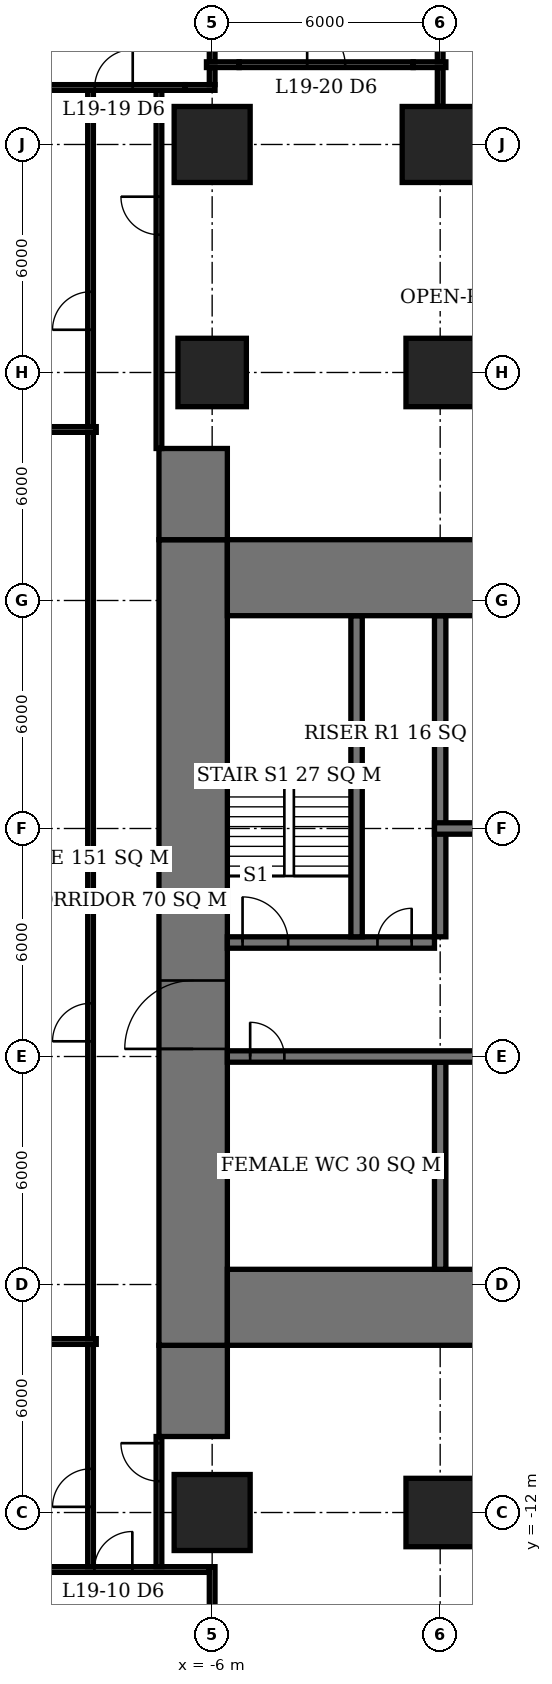
"""IFC4 building model, lengths in metres.
Left out: names, types, materials, properties, quantities, classifications, styles, units other than length and angle.
Written with IfcOpenShell. Run it as: python <this file> out.ifc"""

import sys

from ifc_helpers import new_model, si_unit, direction, frame, frame_2d, origin, origin_2d, place, context, subcontext, project, spatial, rectangle, extrude, element, fill, save


model = new_model("IFC4")
c1 = context("Model", 3, precision=1e-05, world=origin(), true_north=direction((0.0, 1.0)))
c2 = subcontext(c1, "Body", "Model", "MODEL_VIEW")
j1 = project(units=[si_unit("LENGTHUNIT", "METRE"), si_unit("PLANEANGLEUNIT", "RADIAN")], contexts=[c1])
p1 = place(None, origin())
s1 = spatial("IfcSite", under=j1, at=p1, CompositionType="ELEMENT")
p2 = place(p1, origin())
s2 = spatial("IfcBuilding", under=s1, at=p2, CompositionType="ELEMENT")
p3 = place(p2, frame((0.0, 0.0, 80.6)))
s3 = spatial("IfcBuildingStorey", under=s2, at=p3, CompositionType="ELEMENT", Elevation=80.6)
p4 = place(p3, frame((-6.0, -12.0, 0.0), z_axis=(0.0, 0.0, 1.0), x_axis=(1.0, 0.0, 0.0)))
e1 = element("IfcColumn", 1, at=p4, inside=s3, PredefinedType="COLUMN", context=c2, shape_type="SweptSolid", body=[
    extrude(rectangle(XDim=2.0, YDim=2.0, at=origin_2d()), origin(), (0.0, 0.0, 1.0), 3.9),
])
p5 = place(p3, frame((-6.0, 18.0, 0.0), z_axis=(0.0, 0.0, 1.0), x_axis=(1.0, 0.0, 0.0)))
e2 = element("IfcColumn", 2, at=p5, inside=s3, PredefinedType="COLUMN", context=c2, shape_type="SweptSolid", body=[
    extrude(rectangle(XDim=1.8, YDim=1.8, at=origin_2d()), origin(), (0.0, 0.0, 1.0), 3.9),
])
p6 = place(p3, frame((-6.0, 24.0, 0.0), z_axis=(0.0, 0.0, 1.0), x_axis=(1.0, 0.0, 0.0)))
e3 = element("IfcColumn", 3, at=p6, inside=s3, PredefinedType="COLUMN", context=c2, shape_type="SweptSolid", body=[
    extrude(rectangle(XDim=2.0, YDim=2.0, at=origin_2d()), origin(), (0.0, 0.0, 1.0), 3.9),
])
for number, where, z_axis, x_axis in (
    (4, (0.0, -12.0, 0.0), (0.0, 0.0, 1.0), (1.0, 0.0, 0.0)),
    (5, (0.0, 18.0, 0.0), (0.0, 0.0, 1.0), (1.0, 0.0, 0.0)),
):
    element("IfcColumn", number, at=place(p3, frame(where, z_axis=z_axis, x_axis=x_axis)), inside=s3, PredefinedType="COLUMN", context=c2, shape_type="SweptSolid", body=[
        extrude(rectangle(XDim=1.8, YDim=1.8, at=origin_2d()), origin(), (0.0, 0.0, 1.0), 3.9),
    ])
p7 = place(p3, frame((0.0, 24.0, 0.0), z_axis=(0.0, 0.0, 1.0), x_axis=(1.0, 0.0, 0.0)))
e6 = element("IfcColumn", 6, at=p7, inside=s3, PredefinedType="COLUMN", context=c2, shape_type="SweptSolid", body=[
    extrude(rectangle(XDim=2.0, YDim=2.0, at=origin_2d()), origin(), (0.0, 0.0, 1.0), 3.9),
])
for number, where, z_axis, x_axis in (
    (7, (-5.6, -6.6, 0.0), (0.0, 0.0, 1.0), (1.0, 0.0, 0.0)),
    (8, (-5.6, 12.6, 0.0), (0.0, 0.0, 1.0), (1.0, 0.0, 0.0)),
):
    element("IfcWall", number, at=place(p3, frame(where, z_axis=z_axis, x_axis=x_axis)), inside=s3, PredefinedType="SHEAR", context=c2, shape_type="SweptSolid", body=[
        extrude(rectangle(XDim=23.2, YDim=2.0, at=frame_2d((11.6, 0.0))), origin(), (0.0, 0.0, 1.0), 3.9),
    ])
p8 = place(p3, frame((-6.5, -7.6, 0.0), z_axis=(0.0, 0.0, 1.0), x_axis=(0.0, 1.0, 0.0)))
e9 = element("IfcWall", 9, at=p8, inside=s3, PredefinedType="SHEAR", context=c2, shape_type="SweptSolid", body=[
    extrude(rectangle(XDim=21.2, YDim=1.8, at=frame_2d((10.6, 0.0))), origin(), (0.0, 0.0, 1.0), 3.9),
])
p9 = place(p8, frame((7.8, 0.0, 0.0)))
e10 = element("IfcOpeningElement", 10, at=p9, cuts=e9, PredefinedType="OPENING", context=c2, shape_type="SweptSolid", body=[
    extrude(rectangle(XDim=1.8, YDim=2.4, at=frame_2d((0.9, 1.2))), frame((0.0, 0.91, 0.0), z_axis=(0.0, -1.0, 0.0), x_axis=(1.0, 0.0, 0.0)), (0.0, 0.0, 1.0), 1.82),
])
for number, where, z_axis, x_axis in (
    (11, (-6.5, -10.0, 0.0), (0.0, 0.0, 1.0), (0.0, 1.0, 0.0)),
    (12, (-6.5, 13.6, 0.0), (0.0, 0.0, 1.0), (0.0, 1.0, 0.0)),
):
    element("IfcWall", number, at=place(p3, frame(where, z_axis=z_axis, x_axis=x_axis)), inside=s3, PredefinedType="SHEAR", context=c2, shape_type="SweptSolid", body=[
        extrude(rectangle(XDim=2.4, YDim=1.8, at=frame_2d((1.2, 0.0))), origin(), (0.0, 0.0, 1.0), 3.9),
    ])
p10 = place(p3, frame((-5.6, 0.0, 0.0), z_axis=(0.0, 0.0, 1.0), x_axis=(1.0, 0.0, 0.0)))
e13 = element("IfcWall", 13, at=p10, inside=s3, PredefinedType="SHEAR", context=c2, shape_type="SweptSolid", body=[
    extrude(rectangle(XDim=17.75, YDim=0.3, at=frame_2d((8.875, 0.0))), origin(), (0.0, 0.0, 1.0), 3.9),
])
p11 = place(p10, frame((0.6, 0.0, 0.0)))
e14 = element("IfcOpeningElement", 14, at=p11, cuts=e13, PredefinedType="OPENING", context=c2, shape_type="SweptSolid", body=[
    extrude(rectangle(XDim=0.9, YDim=2.1, at=frame_2d((0.45, 1.05))), frame((0.0, 0.16, 0.0), z_axis=(0.0, -1.0, 0.0), x_axis=(1.0, 0.0, 0.0)), (0.0, 0.0, 1.0), 0.32),
])
p12 = place(p3, frame((-5.6, 3.0, 0.0), z_axis=(0.0, 0.0, 1.0), x_axis=(1.0, 0.0, 0.0)))
e15 = element("IfcWall", 15, at=p12, inside=s3, PredefinedType="SHEAR", context=c2, shape_type="SweptSolid", body=[
    extrude(rectangle(XDim=5.45, YDim=0.3, at=frame_2d((2.725, 0.0))), origin(), (0.0, 0.0, 1.0), 3.9),
])
p13 = place(p12, frame((0.4, 0.0, 0.0)))
e16 = element("IfcOpeningElement", 16, at=p13, cuts=e15, PredefinedType="OPENING", context=c2, shape_type="SweptSolid", body=[
    extrude(rectangle(XDim=1.2, YDim=2.1, at=frame_2d((0.6, 1.05))), frame((0.0, 0.16, 0.0), z_axis=(0.0, -1.0, 0.0), x_axis=(1.0, 0.0, 0.0)), (0.0, 0.0, 1.0), 0.32),
])
p14 = place(p12, frame((3.95, 0.0, 0.0)))
e17 = element("IfcOpeningElement", 17, at=p14, cuts=e15, PredefinedType="OPENING", context=c2, shape_type="SweptSolid", body=[
    extrude(rectangle(XDim=0.9, YDim=2.1, at=frame_2d((0.45, 1.05))), frame((0.0, 0.16, 0.0), z_axis=(0.0, -1.0, 0.0), x_axis=(1.0, 0.0, 0.0)), (0.0, 0.0, 1.0), 0.32),
])
p15 = place(p3, frame((-0.15, 6.0, 0.0), z_axis=(0.0, 0.0, 1.0), x_axis=(1.0, 0.0, 0.0)))
e18 = element("IfcWall", 18, at=p15, inside=s3, PredefinedType="SHEAR", context=c2, shape_type="SweptSolid", body=[
    extrude(rectangle(XDim=17.75, YDim=0.3, at=frame_2d((8.875, 0.0))), origin(), (0.0, 0.0, 1.0), 3.9),
])
p16 = place(p15, frame((13.15, 0.0, 0.0)))
e19 = element("IfcOpeningElement", 19, at=p16, cuts=e18, PredefinedType="OPENING", context=c2, shape_type="SweptSolid", body=[
    extrude(rectangle(XDim=0.9, YDim=2.1, at=frame_2d((0.45, 1.05))), frame((0.0, 0.16, 0.0), z_axis=(0.0, -1.0, 0.0), x_axis=(1.0, 0.0, 0.0)), (0.0, 0.0, 1.0), 0.32),
])
p17 = place(p15, frame((16.25, 0.0, 0.0)))
e20 = element("IfcOpeningElement", 20, at=p17, cuts=e18, PredefinedType="OPENING", context=c2, shape_type="SweptSolid", body=[
    extrude(rectangle(XDim=1.0, YDim=2.1, at=frame_2d((0.5, 1.05))), frame((0.0, 0.16, 0.0), z_axis=(0.0, -1.0, 0.0), x_axis=(1.0, 0.0, 0.0)), (0.0, 0.0, 1.0), 0.32),
])
p18 = place(p15, frame((1.1, 0.0, 0.0)))
e21 = element("IfcOpeningElement", 21, at=p18, cuts=e18, PredefinedType="OPENING", context=c2, shape_type="SweptSolid", body=[
    extrude(rectangle(XDim=1.1, YDim=2.1, at=frame_2d((0.55, 1.05))), frame((0.0, 0.16, 0.0), z_axis=(0.0, -1.0, 0.0), x_axis=(1.0, 0.0, 0.0)), (0.0, 0.0, 1.0), 0.32),
])
p19 = place(p15, frame((4.1, 0.0, 0.0)))
e22 = element("IfcOpeningElement", 22, at=p19, cuts=e18, PredefinedType="OPENING", context=c2, shape_type="SweptSolid", body=[
    extrude(rectangle(XDim=1.1, YDim=2.1, at=frame_2d((0.55, 1.05))), frame((0.0, 0.16, 0.0), z_axis=(0.0, -1.0, 0.0), x_axis=(1.0, 0.0, 0.0)), (0.0, 0.0, 1.0), 0.32),
])
p20 = place(p15, frame((7.1, 0.0, 0.0)))
e23 = element("IfcOpeningElement", 23, at=p20, cuts=e18, PredefinedType="OPENING", context=c2, shape_type="SweptSolid", body=[
    extrude(rectangle(XDim=1.1, YDim=2.1, at=frame_2d((0.55, 1.05))), frame((0.0, 0.16, 0.0), z_axis=(0.0, -1.0, 0.0), x_axis=(1.0, 0.0, 0.0)), (0.0, 0.0, 1.0), 0.32),
])
p21 = place(p15, frame((10.1, 0.0, 0.0)))
e24 = element("IfcOpeningElement", 24, at=p21, cuts=e18, PredefinedType="OPENING", context=c2, shape_type="SweptSolid", body=[
    extrude(rectangle(XDim=1.1, YDim=2.1, at=frame_2d((0.55, 1.05))), frame((0.0, 0.16, 0.0), z_axis=(0.0, -1.0, 0.0), x_axis=(1.0, 0.0, 0.0)), (0.0, 0.0, 1.0), 0.32),
])
p22 = place(p3, frame((0.0, -5.6, 0.0), z_axis=(0.0, 0.0, 1.0), x_axis=(0.0, 1.0, 0.0)))
e25 = element("IfcWall", 25, at=p22, inside=s3, PredefinedType="SHEAR", context=c2, shape_type="SweptSolid", body=[
    extrude(rectangle(XDim=5.45, YDim=0.3, at=frame_2d((2.725, 0.0))), origin(), (0.0, 0.0, 1.0), 3.9),
])
for number, where, z_axis, x_axis in (
    (26, (0.0, 3.15, 0.0), (0.0, 0.0, 1.0), (0.0, 1.0, 0.0)),
    (27, (-2.2, 3.15, 0.0), (0.0, 0.0, 1.0), (0.0, 1.0, 0.0)),
):
    element("IfcWall", number, at=place(p3, frame(where, z_axis=z_axis, x_axis=x_axis)), inside=s3, PredefinedType="SHEAR", context=c2, shape_type="SweptSolid", body=[
        extrude(rectangle(XDim=8.45, YDim=0.3, at=frame_2d((4.225, 0.0))), origin(), (0.0, 0.0, 1.0), 3.9),
    ])
p23 = place(p3, frame((-11.925, -13.5, 0.0), z_axis=(0.0, 0.0, 1.0), x_axis=(1.0, 0.0, 0.0)))
e28 = element("IfcWall", 28, at=p23, inside=s3, PredefinedType="PARTITIONING", context=c2, shape_type="SweptSolid", body=[
    extrude(rectangle(XDim=5.85, YDim=0.15, at=frame_2d((2.925, 0.0))), origin(), (0.0, 0.0, 1.0), 3.65),
])
p24 = place(p23, frame((2.825, 0.0, 0.0)))
e29 = element("IfcOpeningElement", 29, at=p24, cuts=e28, PredefinedType="OPENING", context=c2, shape_type="SweptSolid", body=[
    extrude(rectangle(XDim=1.0, YDim=2.1, at=frame_2d((0.5, 1.05))), frame((0.0, 0.085, 0.0), z_axis=(0.0, -1.0, 0.0), x_axis=(1.0, 0.0, 0.0)), (0.0, 0.0, 1.0), 0.17),
])
p25 = place(p3, frame((-11.49, 25.5, 0.0), z_axis=(0.0, 0.0, 1.0), x_axis=(1.0, 0.0, 0.0)))
e30 = element("IfcWall", 30, at=p25, inside=s3, PredefinedType="PARTITIONING", context=c2, shape_type="SweptSolid", body=[
    extrude(rectangle(XDim=4.78, YDim=0.15, at=frame_2d((2.39, 0.0))), origin(), (0.0, 0.0, 1.0), 3.65),
])
p26 = place(p25, frame((2.4, 0.0, 0.0)))
e31 = element("IfcOpeningElement", 31, at=p26, cuts=e30, PredefinedType="OPENING", context=c2, shape_type="SweptSolid", body=[
    extrude(rectangle(XDim=1.0, YDim=2.1, at=frame_2d((0.5, 1.05))), frame((0.0, 0.085, 0.0), z_axis=(0.0, -1.0, 0.0), x_axis=(1.0, 0.0, 0.0)), (0.0, 0.0, 1.0), 0.17),
])
p27 = place(p3, frame((-6.71, 25.5, 0.0), z_axis=(0.0, 0.0, 1.0), x_axis=(1.0, 0.0, 0.0)))
e32 = element("IfcWall", 32, at=p27, inside=s3, PredefinedType="PARTITIONING", context=c2, shape_type="SweptSolid", body=[
    extrude(rectangle(XDim=0.785, YDim=0.15, at=frame_2d((0.393, 0.0))), origin(), (0.0, 0.0, 1.0), 2.65),
])
p28 = place(p3, frame((-6.15, 26.1, 0.0), z_axis=(0.0, 0.0, 1.0), x_axis=(1.0, 0.0, 0.0)))
e33 = element("IfcWall", 33, at=p28, inside=s3, PredefinedType="PARTITIONING", context=c2, shape_type="SweptSolid", body=[
    extrude(rectangle(XDim=0.86, YDim=0.15, at=frame_2d((0.43, 0.0))), origin(), (0.0, 0.0, 1.0), 2.65),
])
p29 = place(p3, frame((-5.29, 26.1, 0.0), z_axis=(0.0, 0.0, 1.0), x_axis=(1.0, 0.0, 0.0)))
e34 = element("IfcWall", 34, at=p29, inside=s3, PredefinedType="PARTITIONING", context=c2, shape_type="SweptSolid", body=[
    extrude(rectangle(XDim=4.58, YDim=0.15, at=frame_2d((2.29, 0.0))), origin(), (0.0, 0.0, 1.0), 3.65),
])
p30 = place(p29, frame((1.79, 0.0, 0.0)))
e35 = element("IfcOpeningElement", 35, at=p30, cuts=e34, PredefinedType="OPENING", context=c2, shape_type="SweptSolid", body=[
    extrude(rectangle(XDim=1.0, YDim=2.1, at=frame_2d((0.5, 1.05))), frame((0.0, 0.085, 0.0), z_axis=(0.0, -1.0, 0.0), x_axis=(1.0, 0.0, 0.0)), (0.0, 0.0, 1.0), 0.17),
])
p31 = place(p3, frame((-0.71, 26.1, 0.0), z_axis=(0.0, 0.0, 1.0), x_axis=(1.0, 0.0, 0.0)))
e36 = element("IfcWall", 36, at=p31, inside=s3, PredefinedType="PARTITIONING", context=c2, shape_type="SweptSolid", body=[
    extrude(rectangle(XDim=0.86, YDim=0.15, at=frame_2d((0.43, 0.0))), origin(), (0.0, 0.0, 1.0), 2.65),
])
p32 = place(p3, frame((-6.0, -17.2, 0.0), z_axis=(0.0, 0.0, 1.0), x_axis=(0.0, 1.0, 0.0)))
e37 = element("IfcWall", 37, at=p32, inside=s3, PredefinedType="PARTITIONING", context=c2, shape_type="SweptSolid", body=[
    extrude(rectangle(XDim=3.775, YDim=0.15, at=frame_2d((1.887, 0.0))), origin(), (0.0, 0.0, 1.0), 3.65),
])
p33 = place(p3, frame((-6.0, 25.575, 0.0), z_axis=(0.0, 0.0, 1.0), x_axis=(0.0, 1.0, 0.0)))
e38 = element("IfcWall", 38, at=p33, inside=s3, PredefinedType="PARTITIONING", context=c2, shape_type="SweptSolid", body=[
    extrude(rectangle(XDim=0.45, YDim=0.15, at=frame_2d((0.225, 0.0))), origin(), (0.0, 0.0, 1.0), 2.65),
])
p34 = place(p3, frame((-6.0, 26.175, 0.0), z_axis=(0.0, 0.0, 1.0), x_axis=(0.0, 1.0, 0.0)))
e39 = element("IfcWall", 39, at=p34, inside=s3, PredefinedType="PARTITIONING", context=c2, shape_type="SweptSolid", body=[
    extrude(rectangle(XDim=2.135, YDim=0.15, at=frame_2d((1.067, 0.0))), origin(), (0.0, 0.0, 1.0), 2.65),
])
p35 = place(p3, frame((0.0, 25.0, 0.0), z_axis=(0.0, 0.0, 1.0), x_axis=(0.0, 1.0, 0.0)))
e40 = element("IfcWall", 40, at=p35, inside=s3, PredefinedType="PARTITIONING", context=c2, shape_type="SweptSolid", body=[
    extrude(rectangle(XDim=1.025, YDim=0.15, at=frame_2d((0.512, 0.0))), origin(), (0.0, 0.0, 1.0), 2.65),
])
p36 = place(p3, frame((0.0, 26.175, 0.0), z_axis=(0.0, 0.0, 1.0), x_axis=(0.0, 1.0, 0.0)))
e41 = element("IfcWall", 41, at=p36, inside=s3, PredefinedType="PARTITIONING", context=c2, shape_type="SweptSolid", body=[
    extrude(rectangle(XDim=2.135, YDim=0.15, at=frame_2d((1.067, 0.0))), origin(), (0.0, 0.0, 1.0), 2.65),
])
p37 = place(p3, frame((-19.6, -7.5, 0.0), z_axis=(0.0, 0.0, 1.0), x_axis=(1.0, 0.0, 0.0)))
e42 = element("IfcWall", 42, at=p37, inside=s3, PredefinedType="PARTITIONING", context=c2, shape_type="SweptSolid", body=[
    extrude(rectangle(XDim=10.55, YDim=0.15, at=frame_2d((5.275, 0.0))), origin(), (0.0, 0.0, 1.0), 3.65),
])
p38 = place(p3, frame((-14.025, 16.5, 0.0), z_axis=(0.0, 0.0, 1.0), x_axis=(1.0, 0.0, 0.0)))
e43 = element("IfcWall", 43, at=p38, inside=s3, PredefinedType="PARTITIONING", context=c2, shape_type="SweptSolid", body=[
    extrude(rectangle(XDim=4.975, YDim=0.15, at=frame_2d((2.487, 0.0))), origin(), (0.0, 0.0, 1.0), 3.65),
])
p39 = place(p3, frame((-9.2, -13.425, 0.0), z_axis=(0.0, 0.0, 1.0), x_axis=(0.0, 1.0, 0.0)))
e44 = element("IfcWall", 44, at=p39, inside=s3, PredefinedType="PARTITIONING", context=c2, shape_type="SweptSolid", body=[
    extrude(rectangle(XDim=5.85, YDim=0.15, at=frame_2d((2.925, 0.0))), origin(), (0.0, 0.0, 1.0), 3.65),
])
p40 = place(p39, frame((1.574, 0.0, 0.0)))
e45 = element("IfcOpeningElement", 45, at=p40, cuts=e44, PredefinedType="OPENING", context=c2, shape_type="SweptSolid", body=[
    extrude(rectangle(XDim=1.0, YDim=2.1, at=frame_2d((0.5, 1.05))), frame((0.0, 0.085, 0.0), z_axis=(0.0, -1.0, 0.0), x_axis=(1.0, 0.0, 0.0)), (0.0, 0.0, 1.0), 0.17),
])
p41 = place(p3, frame((-9.2, -7.425, 0.0), z_axis=(0.0, 0.0, 1.0), x_axis=(0.0, 1.0, 0.0)))
e46 = element("IfcWall", 46, at=p41, inside=s3, PredefinedType="PARTITIONING", context=c2, shape_type="SweptSolid", body=[
    extrude(rectangle(XDim=23.85, YDim=0.15, at=frame_2d((11.925, 0.0))), origin(), (0.0, 0.0, 1.0), 3.65),
])
p42 = place(p41, frame((7.825, 0.0, 0.0)))
e47 = element("IfcOpeningElement", 47, at=p42, cuts=e46, PredefinedType="OPENING", context=c2, shape_type="SweptSolid", body=[
    extrude(rectangle(XDim=1.0, YDim=2.1, at=frame_2d((0.5, 1.05))), frame((0.0, 0.085, 0.0), z_axis=(0.0, -1.0, 0.0), x_axis=(1.0, 0.0, 0.0)), (0.0, 0.0, 1.0), 0.17),
])
p43 = place(p3, frame((-9.2, 16.575, 0.0), z_axis=(0.0, 0.0, 1.0), x_axis=(0.0, 1.0, 0.0)))
e48 = element("IfcWall", 48, at=p43, inside=s3, PredefinedType="PARTITIONING", context=c2, shape_type="SweptSolid", body=[
    extrude(rectangle(XDim=8.85, YDim=0.15, at=frame_2d((4.425, 0.0))), origin(), (0.0, 0.0, 1.0), 3.65),
])
p44 = place(p43, frame((2.549, 0.0, 0.0)))
e49 = element("IfcOpeningElement", 49, at=p44, cuts=e48, PredefinedType="OPENING", context=c2, shape_type="SweptSolid", body=[
    extrude(rectangle(XDim=1.0, YDim=2.1, at=frame_2d((0.5, 1.05))), frame((0.0, 0.085, 0.0), z_axis=(0.0, -1.0, 0.0), x_axis=(1.0, 0.0, 0.0)), (0.0, 0.0, 1.0), 0.17),
])
p45 = place(p3, frame((-7.4, -13.425, 0.0), z_axis=(0.0, 0.0, 1.0), x_axis=(0.0, 1.0, 0.0)))
e50 = element("IfcWall", 50, at=p45, inside=s3, PredefinedType="PARTITIONING", context=c2, shape_type="SweptSolid", body=[
    extrude(rectangle(XDim=3.425, YDim=0.15, at=frame_2d((1.712, 0.0))), origin(), (0.0, 0.0, 1.0), 3.65),
])
p46 = place(p45, frame((2.25, 0.0, 0.0)))
e51 = element("IfcOpeningElement", 51, at=p46, cuts=e50, PredefinedType="OPENING", context=c2, shape_type="SweptSolid", body=[
    extrude(rectangle(XDim=1.0, YDim=2.1, at=frame_2d((0.5, 1.05))), frame((0.0, 0.085, 0.0), z_axis=(0.0, -1.0, 0.0), x_axis=(1.0, 0.0, 0.0)), (0.0, 0.0, 1.0), 0.17),
])
p47 = place(p3, frame((-7.4, 16.0, 0.0), z_axis=(0.0, 0.0, 1.0), x_axis=(0.0, 1.0, 0.0)))
e52 = element("IfcWall", 52, at=p47, inside=s3, PredefinedType="PARTITIONING", context=c2, shape_type="SweptSolid", body=[
    extrude(rectangle(XDim=9.425, YDim=0.15, at=frame_2d((4.712, 0.0))), origin(), (0.0, 0.0, 1.0), 3.65),
])
p48 = place(p47, frame((5.626, 0.0, 0.0)))
e53 = element("IfcOpeningElement", 53, at=p48, cuts=e52, PredefinedType="OPENING", context=c2, shape_type="SweptSolid", body=[
    extrude(rectangle(XDim=1.0, YDim=2.1, at=frame_2d((0.5, 1.05))), frame((0.0, 0.085, 0.0), z_axis=(0.0, -1.0, 0.0), x_axis=(1.0, 0.0, 0.0)), (0.0, 0.0, 1.0), 0.17),
])
p49 = place(p9, origin())
e54 = element("IfcDoor", 54, at=p49, inside=s3, OperationType="DOUBLE_DOOR_SINGLE_SWING", PredefinedType="DOOR", context=c2, shape_type="SweptSolid", body=[
    extrude(rectangle(XDim=1.8, YDim=2.4, at=frame_2d((0.9, 1.2))), frame((0.0, 0.025, 0.0), z_axis=(0.0, -1.0, 0.0), x_axis=(1.0, 0.0, 0.0)), (0.0, 0.0, 1.0), 0.05),
])
fill(e10, e54)
p50 = place(p13, origin())
e55 = element("IfcDoor", 55, at=p50, inside=s3, OperationType="SINGLE_SWING_LEFT", PredefinedType="DOOR", context=c2, shape_type="SweptSolid", body=[
    extrude(rectangle(XDim=1.2, YDim=2.1, at=frame_2d((0.6, 1.05))), frame((0.0, 0.025, 0.0), z_axis=(0.0, -1.0, 0.0), x_axis=(1.0, 0.0, 0.0)), (0.0, 0.0, 1.0), 0.05),
])
fill(e16, e55)
p51 = place(p14, origin())
e56 = element("IfcDoor", 56, at=p51, inside=s3, OperationType="SINGLE_SWING_RIGHT", PredefinedType="DOOR", context=c2, shape_type="SweptSolid", body=[
    extrude(rectangle(XDim=0.9, YDim=2.1, at=frame_2d((0.45, 1.05))), frame((0.0, 0.025, 0.0), z_axis=(0.0, -1.0, 0.0), x_axis=(1.0, 0.0, 0.0)), (0.0, 0.0, 1.0), 0.05),
])
fill(e17, e56)
p52 = place(p11, origin())
e57 = element("IfcDoor", 57, at=p52, inside=s3, OperationType="SINGLE_SWING_LEFT", PredefinedType="DOOR", context=c2, shape_type="SweptSolid", body=[
    extrude(rectangle(XDim=0.9, YDim=2.1, at=frame_2d((0.45, 1.05))), frame((0.0, 0.025, 0.0), z_axis=(0.0, -1.0, 0.0), x_axis=(1.0, 0.0, 0.0)), (0.0, 0.0, 1.0), 0.05),
])
fill(e14, e57)
p53 = place(p24, origin())
e58 = element("IfcDoor", 58, at=p53, inside=s3, OperationType="SINGLE_SWING_RIGHT", PredefinedType="DOOR", context=c2, shape_type="SweptSolid", body=[
    extrude(rectangle(XDim=1.0, YDim=2.1, at=frame_2d((0.5, 1.05))), frame((0.0, 0.025, 0.0), z_axis=(0.0, -1.0, 0.0), x_axis=(1.0, 0.0, 0.0)), (0.0, 0.0, 1.0), 0.05),
])
fill(e29, e58)
p54 = place(p26, origin())
e59 = element("IfcDoor", 59, at=p54, inside=s3, OperationType="SINGLE_SWING_RIGHT", PredefinedType="DOOR", context=c2, shape_type="SweptSolid", body=[
    extrude(rectangle(XDim=1.0, YDim=2.1, at=frame_2d((0.5, 1.05))), frame((0.0, 0.025, 0.0), z_axis=(0.0, -1.0, 0.0), x_axis=(1.0, 0.0, 0.0)), (0.0, 0.0, 1.0), 0.05),
])
fill(e31, e59)
p55 = place(p30, origin())
e60 = element("IfcDoor", 60, at=p55, inside=s3, OperationType="SINGLE_SWING_LEFT", PredefinedType="DOOR", context=c2, shape_type="SweptSolid", body=[
    extrude(rectangle(XDim=1.0, YDim=2.1, at=frame_2d((0.5, 1.05))), frame((0.0, 0.025, 0.0), z_axis=(0.0, -1.0, 0.0), x_axis=(1.0, 0.0, 0.0)), (0.0, 0.0, 1.0), 0.05),
])
fill(e35, e60)
p56 = place(p40, origin())
e61 = element("IfcDoor", 61, at=p56, inside=s3, OperationType="SINGLE_SWING_LEFT", PredefinedType="DOOR", context=c2, shape_type="SweptSolid", body=[
    extrude(rectangle(XDim=1.0, YDim=2.1, at=frame_2d((0.5, 1.05))), frame((0.0, 0.025, 0.0), z_axis=(0.0, -1.0, 0.0), x_axis=(1.0, 0.0, 0.0)), (0.0, 0.0, 1.0), 0.05),
])
fill(e45, e61)
p57 = place(p42, origin())
e62 = element("IfcDoor", 62, at=p57, inside=s3, OperationType="SINGLE_SWING_LEFT", PredefinedType="DOOR", context=c2, shape_type="SweptSolid", body=[
    extrude(rectangle(XDim=1.0, YDim=2.1, at=frame_2d((0.5, 1.05))), frame((0.0, 0.025, 0.0), z_axis=(0.0, -1.0, 0.0), x_axis=(1.0, 0.0, 0.0)), (0.0, 0.0, 1.0), 0.05),
])
fill(e47, e62)
p58 = place(p48, origin())
e63 = element("IfcDoor", 63, at=p58, inside=s3, OperationType="SINGLE_SWING_RIGHT", PredefinedType="DOOR", context=c2, shape_type="SweptSolid", body=[
    extrude(rectangle(XDim=1.0, YDim=2.1, at=frame_2d((0.5, 1.05))), frame((0.0, 0.025, 0.0), z_axis=(0.0, -1.0, 0.0), x_axis=(1.0, 0.0, 0.0)), (0.0, 0.0, 1.0), 0.05),
])
fill(e53, e63)
p59 = place(p44, origin())
e64 = element("IfcDoor", 64, at=p59, inside=s3, OperationType="SINGLE_SWING_LEFT", PredefinedType="DOOR", context=c2, shape_type="SweptSolid", body=[
    extrude(rectangle(XDim=1.0, YDim=2.1, at=frame_2d((0.5, 1.05))), frame((0.0, 0.025, 0.0), z_axis=(0.0, -1.0, 0.0), x_axis=(1.0, 0.0, 0.0)), (0.0, 0.0, 1.0), 0.05),
])
fill(e49, e64)
p60 = place(p46, origin())
e65 = element("IfcDoor", 65, at=p60, inside=s3, OperationType="SINGLE_SWING_RIGHT", PredefinedType="DOOR", context=c2, shape_type="SweptSolid", body=[
    extrude(rectangle(XDim=1.0, YDim=2.1, at=frame_2d((0.5, 1.05))), frame((0.0, 0.025, 0.0), z_axis=(0.0, -1.0, 0.0), x_axis=(1.0, 0.0, 0.0)), (0.0, 0.0, 1.0), 0.05),
])
fill(e51, e65)
save(model, sys.argv[1])
